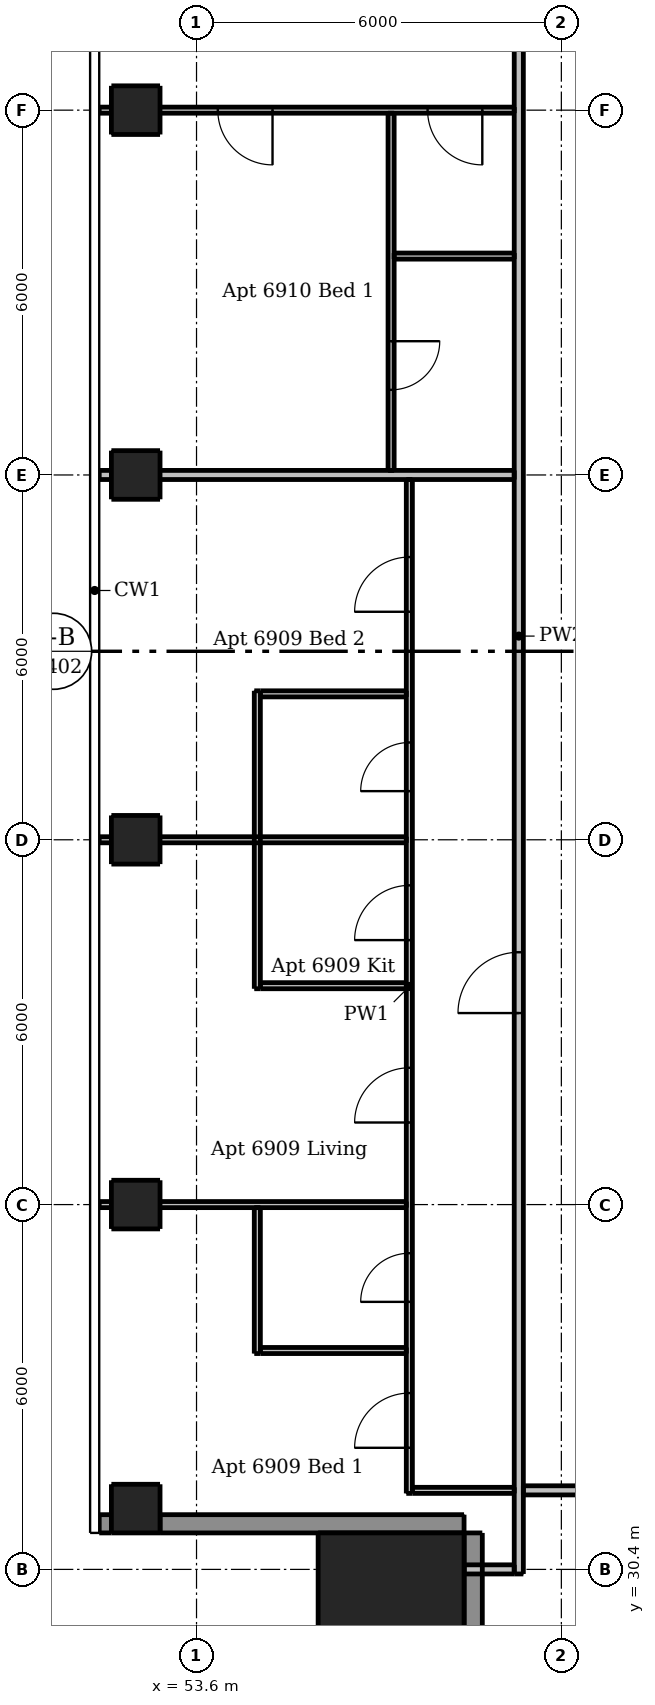
"""IFC4 building model, lengths in metres.
Left out: names, types, materials, properties, quantities, classifications, styles, units other than length and angle.
Written with IfcOpenShell. Run it as: python <this file> out.ifc"""

import sys

from ifc_helpers import new_model, si_unit, direction, frame, frame_2d, origin, origin_2d, place, context, subcontext, project, spatial, rectangle, extrude, element, fill, save


model = new_model("IFC4")
c1 = context("Model", 3, precision=1e-05, world=origin(), true_north=direction((0.0, 1.0)))
c2 = subcontext(c1, "Body", "Model", "MODEL_VIEW")
j1 = project(units=[si_unit("LENGTHUNIT", "METRE"), si_unit("PLANEANGLEUNIT", "RADIAN")], contexts=[c1])
p1 = place(None, origin())
s1 = spatial("IfcSite", under=j1, at=p1, CompositionType="ELEMENT")
p2 = place(p1, origin())
s2 = spatial("IfcBuilding", under=s1, at=p2, CompositionType="ELEMENT")
p3 = place(p2, frame((0.0, 0.0, 258.7)))
s3 = spatial("IfcBuildingStorey", under=s2, at=p3, CompositionType="ELEMENT", Elevation=258.7)
for number, where, z_axis, x_axis in (
    (1, (52.6, 31.4, 0.0), (0.0, 0.0, 1.0), (1.0, 0.0, 0.0)),
    (2, (52.6, 36.4, 0.0), (0.0, 0.0, 1.0), (1.0, 0.0, 0.0)),
    (3, (52.6, 42.4, 0.0), (0.0, 0.0, 1.0), (1.0, 0.0, 0.0)),
    (4, (52.6, 48.4, 0.0), (0.0, 0.0, 1.0), (1.0, 0.0, 0.0)),
    (5, (52.6, 54.4, 0.0), (0.0, 0.0, 1.0), (1.0, 0.0, 0.0)),
):
    element("IfcColumn", number, at=place(p3, frame(where, z_axis=z_axis, x_axis=x_axis)), inside=s3, PredefinedType="COLUMN", context=c2, shape_type="SweptSolid", body=[
        extrude(rectangle(XDim=0.8, YDim=0.8, at=origin_2d()), origin(), (0.0, 0.0, 1.0), 3.05),
    ])
p4 = place(p3, frame((56.8, 29.8, 0.0), z_axis=(0.0, 0.0, 1.0), x_axis=(1.0, 0.0, 0.0)))
e6 = element("IfcColumn", 6, at=p4, inside=s3, PredefinedType="COLUMN", context=c2, shape_type="SweptSolid", body=[
    extrude(rectangle(XDim=2.4, YDim=2.4, at=origin_2d()), origin(), (0.0, 0.0, 1.0), 3.3),
])
p5 = place(p3, frame((52.0, 31.15, 0.0), z_axis=(0.0, 0.0, 1.0), x_axis=(1.0, 0.0, 0.0)))
e7 = element("IfcWall", 7, at=p5, inside=s3, PredefinedType="SOLIDWALL", context=c2, shape_type="SweptSolid", body=[
    extrude(rectangle(XDim=0.2, YDim=0.3, at=frame_2d((0.1, 0.0))), origin(), (0.0, 0.0, 1.0), 3.05),
])
p6 = place(p3, frame((53.0, 31.15, 0.0), z_axis=(0.0, 0.0, 1.0), x_axis=(1.0, 0.0, 0.0)))
e8 = element("IfcWall", 8, at=p6, inside=s3, PredefinedType="SOLIDWALL", context=c2, shape_type="SweptSolid", body=[
    extrude(rectangle(XDim=5.0, YDim=0.3, at=frame_2d((2.5, 0.0))), origin(), (0.0, 0.0, 1.0), 3.05),
])
p7 = place(p3, frame((58.15, 31.0, 0.0), z_axis=(0.0, 0.0, 1.0), x_axis=(0.0, -1.0, 0.0)))
e9 = element("IfcWall", 9, at=p7, inside=s3, PredefinedType="SOLIDWALL", context=c2, shape_type="SweptSolid", body=[
    extrude(rectangle(XDim=6.0, YDim=0.3, at=frame_2d((3.0, 0.0))), origin(), (0.0, 0.0, 1.0), 3.05),
])
p8 = place(p7, frame((1.8, 0.0, 0.15)))
e10 = element("IfcOpeningElement", 10, at=p8, cuts=e9, PredefinedType="OPENING", context=c2, shape_type="SweptSolid", body=[
    extrude(rectangle(XDim=2.4, YDim=2.1, at=frame_2d((1.2, 1.05))), frame((0.0, 0.16, 0.0), z_axis=(0.0, -1.0, 0.0), x_axis=(1.0, 0.0, 0.0)), (0.0, 0.0, 1.0), 0.32),
])
p9 = place(p3, frame((54.6, 33.95, 0.0), z_axis=(0.0, 0.0, 1.0), x_axis=(0.0, 1.0, 0.0)))
e11 = element("IfcWall", 11, at=p9, inside=s3, PredefinedType="PARTITIONING", context=c2, shape_type="SweptSolid", body=[
    extrude(rectangle(XDim=2.4, YDim=0.1, at=frame_2d((1.2, 0.0))), origin(), (0.0, 0.0, 1.0), 3.05),
])
p10 = place(p3, frame((54.6, 39.95, 0.0), z_axis=(0.0, 0.0, 1.0), x_axis=(0.0, 1.0, 0.0)))
e12 = element("IfcWall", 12, at=p10, inside=s3, PredefinedType="PARTITIONING", context=c2, shape_type="SweptSolid", body=[
    extrude(rectangle(XDim=4.9, YDim=0.1, at=frame_2d((2.45, 0.0))), origin(), (0.0, 0.0, 1.0), 3.05),
])
p11 = place(p3, frame((56.8, 54.35, 0.0), z_axis=(0.0, 0.0, 1.0), x_axis=(0.0, -1.0, 0.0)))
e13 = element("IfcWall", 13, at=p11, inside=s3, PredefinedType="PARTITIONING", context=c2, shape_type="SweptSolid", body=[
    extrude(rectangle(XDim=5.875, YDim=0.1, at=frame_2d((2.938, 0.0))), origin(), (0.0, 0.0, 1.0), 3.05),
])
p12 = place(p11, frame((3.75, 0.0, 0.0)))
e14 = element("IfcOpeningElement", 14, at=p12, cuts=e13, PredefinedType="OPENING", context=c2, shape_type="SweptSolid", body=[
    extrude(rectangle(XDim=0.8, YDim=2.1, at=frame_2d((0.4, 1.05))), frame((0.0, 0.06, 0.0), z_axis=(0.0, -1.0, 0.0), x_axis=(1.0, 0.0, 0.0)), (0.0, 0.0, 1.0), 0.12),
])
p13 = place(p3, frame((57.1, 31.65, 0.0), z_axis=(0.0, 0.0, 1.0), x_axis=(0.0, 1.0, 0.0)))
e15 = element("IfcWall", 15, at=p13, inside=s3, PredefinedType="PARTITIONING", context=c2, shape_type="SweptSolid", body=[
    extrude(rectangle(XDim=16.675, YDim=0.1, at=frame_2d((8.337, 0.0))), origin(), (0.0, 0.0, 1.0), 3.05),
])
p14 = place(p13, frame((6.1, 0.0, 0.0)))
e16 = element("IfcOpeningElement", 16, at=p14, cuts=e15, PredefinedType="OPENING", context=c2, shape_type="SweptSolid", body=[
    extrude(rectangle(XDim=0.9, YDim=2.1, at=frame_2d((0.45, 1.05))), frame((0.0, 0.06, 0.0), z_axis=(0.0, -1.0, 0.0), x_axis=(1.0, 0.0, 0.0)), (0.0, 0.0, 1.0), 0.12),
])
p15 = place(p13, frame((9.1, 0.0, 0.0)))
e17 = element("IfcOpeningElement", 17, at=p15, cuts=e15, PredefinedType="OPENING", context=c2, shape_type="SweptSolid", body=[
    extrude(rectangle(XDim=0.9, YDim=2.1, at=frame_2d((0.45, 1.05))), frame((0.0, 0.06, 0.0), z_axis=(0.0, -1.0, 0.0), x_axis=(1.0, 0.0, 0.0)), (0.0, 0.0, 1.0), 0.12),
])
p16 = place(p13, frame((0.75, 0.0, 0.0)))
e18 = element("IfcOpeningElement", 18, at=p16, cuts=e15, PredefinedType="OPENING", context=c2, shape_type="SweptSolid", body=[
    extrude(rectangle(XDim=0.9, YDim=2.1, at=frame_2d((0.45, 1.05))), frame((0.0, 0.06, 0.0), z_axis=(0.0, -1.0, 0.0), x_axis=(1.0, 0.0, 0.0)), (0.0, 0.0, 1.0), 0.12),
])
p17 = place(p13, frame((14.5, 0.0, 0.0)))
e19 = element("IfcOpeningElement", 19, at=p17, cuts=e15, PredefinedType="OPENING", context=c2, shape_type="SweptSolid", body=[
    extrude(rectangle(XDim=0.9, YDim=2.1, at=frame_2d((0.45, 1.05))), frame((0.0, 0.06, 0.0), z_axis=(0.0, -1.0, 0.0), x_axis=(1.0, 0.0, 0.0)), (0.0, 0.0, 1.0), 0.12),
])
p18 = place(p13, frame((3.15, 0.0, 0.0)))
e20 = element("IfcOpeningElement", 20, at=p18, cuts=e15, PredefinedType="OPENING", context=c2, shape_type="SweptSolid", body=[
    extrude(rectangle(XDim=0.8, YDim=2.1, at=frame_2d((0.4, 1.05))), frame((0.0, 0.06, 0.0), z_axis=(0.0, -1.0, 0.0), x_axis=(1.0, 0.0, 0.0)), (0.0, 0.0, 1.0), 0.12),
])
p19 = place(p13, frame((11.55, 0.0, 0.0)))
e21 = element("IfcOpeningElement", 21, at=p19, cuts=e15, PredefinedType="OPENING", context=c2, shape_type="SweptSolid", body=[
    extrude(rectangle(XDim=0.8, YDim=2.1, at=frame_2d((0.4, 1.05))), frame((0.0, 0.06, 0.0), z_axis=(0.0, -1.0, 0.0), x_axis=(1.0, 0.0, 0.0)), (0.0, 0.0, 1.0), 0.12),
])
p20 = place(p3, frame((58.825, 54.4, 0.0), z_axis=(0.0, 0.0, 1.0), x_axis=(-1.0, 0.0, 0.0)))
e22 = element("IfcWall", 22, at=p20, inside=s3, PredefinedType="PARTITIONING", context=c2, shape_type="SweptSolid", body=[
    extrude(rectangle(XDim=6.825, YDim=0.1, at=frame_2d((3.413, 0.0))), origin(), (0.0, 0.0, 1.0), 2.516),
])
p21 = place(p20, frame((0.525, 0.0, 0.0)))
e23 = element("IfcOpeningElement", 23, at=p21, cuts=e22, PredefinedType="OPENING", context=c2, shape_type="SweptSolid", body=[
    extrude(rectangle(XDim=0.9, YDim=2.1, at=frame_2d((0.45, 1.05))), frame((0.0, 0.06, 0.0), z_axis=(0.0, -1.0, 0.0), x_axis=(1.0, 0.0, 0.0)), (0.0, 0.0, 1.0), 0.12),
])
p22 = place(p20, frame((3.975, 0.0, 0.0)))
e24 = element("IfcOpeningElement", 24, at=p22, cuts=e22, PredefinedType="OPENING", context=c2, shape_type="SweptSolid", body=[
    extrude(rectangle(XDim=0.9, YDim=2.1, at=frame_2d((0.45, 1.05))), frame((0.0, 0.06, 0.0), z_axis=(0.0, -1.0, 0.0), x_axis=(1.0, 0.0, 0.0)), (0.0, 0.0, 1.0), 0.12),
])
p23 = place(p3, frame((56.85, 52.0, 0.0), z_axis=(0.0, 0.0, 1.0), x_axis=(1.0, 0.0, 0.0)))
e25 = element("IfcWall", 25, at=p23, inside=s3, PredefinedType="PARTITIONING", context=c2, shape_type="SweptSolid", body=[
    extrude(rectangle(XDim=1.975, YDim=0.1, at=frame_2d((0.987, 0.0))), origin(), (0.0, 0.0, 1.0), 3.05),
])
p24 = place(p3, frame((54.65, 44.8, 0.0), z_axis=(0.0, 0.0, 1.0), x_axis=(1.0, 0.0, 0.0)))
e26 = element("IfcWall", 26, at=p24, inside=s3, PredefinedType="PARTITIONING", context=c2, shape_type="SweptSolid", body=[
    extrude(rectangle(XDim=2.4, YDim=0.1, at=frame_2d((1.2, 0.0))), origin(), (0.0, 0.0, 1.0), 3.05),
])
p25 = place(p3, frame((52.0, 42.4, 0.0), z_axis=(0.0, 0.0, 1.0), x_axis=(1.0, 0.0, 0.0)))
e27 = element("IfcWall", 27, at=p25, inside=s3, PredefinedType="PARTITIONING", context=c2, shape_type="SweptSolid", body=[
    extrude(rectangle(XDim=5.05, YDim=0.1, at=frame_2d((2.525, 0.0))), origin(), (0.0, 0.0, 1.0), 2.516),
])
p26 = place(p3, frame((54.65, 40.0, 0.0), z_axis=(0.0, 0.0, 1.0), x_axis=(1.0, 0.0, 0.0)))
e28 = element("IfcWall", 28, at=p26, inside=s3, PredefinedType="PARTITIONING", context=c2, shape_type="SweptSolid", body=[
    extrude(rectangle(XDim=2.4, YDim=0.1, at=frame_2d((1.2, 0.0))), origin(), (0.0, 0.0, 1.0), 3.05),
])
p27 = place(p3, frame((52.0, 36.4, 0.0), z_axis=(0.0, 0.0, 1.0), x_axis=(1.0, 0.0, 0.0)))
e29 = element("IfcWall", 29, at=p27, inside=s3, PredefinedType="PARTITIONING", context=c2, shape_type="SweptSolid", body=[
    extrude(rectangle(XDim=5.05, YDim=0.1, at=frame_2d((2.525, 0.0))), origin(), (0.0, 0.0, 1.0), 2.516),
])
p28 = place(p3, frame((54.65, 34.0, 0.0), z_axis=(0.0, 0.0, 1.0), x_axis=(1.0, 0.0, 0.0)))
e30 = element("IfcWall", 30, at=p28, inside=s3, PredefinedType="PARTITIONING", context=c2, shape_type="SweptSolid", body=[
    extrude(rectangle(XDim=2.4, YDim=0.1, at=frame_2d((1.2, 0.0))), origin(), (0.0, 0.0, 1.0), 3.05),
])
p29 = place(p3, frame((57.15, 31.7, 0.0), z_axis=(0.0, 0.0, 1.0), x_axis=(1.0, 0.0, 0.0)))
e31 = element("IfcWall", 31, at=p29, inside=s3, PredefinedType="PARTITIONING", context=c2, shape_type="SweptSolid", body=[
    extrude(rectangle(XDim=1.675, YDim=0.1, at=frame_2d((0.837, 0.0))), origin(), (0.0, 0.0, 1.0), 3.05),
])
p30 = place(p3, frame((58.9, 30.325, 0.0), z_axis=(0.0, 0.0, 1.0), x_axis=(0.0, 1.0, 0.0)))
e32 = element("IfcWall", 32, at=p30, inside=s3, PredefinedType="PARTITIONING", context=c2, shape_type="SweptSolid", body=[
    extrude(rectangle(XDim=30.85, YDim=0.15, at=frame_2d((15.425, 0.0))), origin(), (0.0, 0.0, 1.0), 3.05),
])
p31 = place(p30, frame((9.225, 0.0, 0.0)))
e33 = element("IfcOpeningElement", 33, at=p31, cuts=e32, PredefinedType="OPENING", context=c2, shape_type="SweptSolid", body=[
    extrude(rectangle(XDim=1.0, YDim=2.1, at=frame_2d((0.5, 1.05))), frame((0.0, 0.085, 0.0), z_axis=(0.0, -1.0, 0.0), x_axis=(1.0, 0.0, 0.0)), (0.0, 0.0, 1.0), 0.17),
])
p32 = place(p30, frame((26.925, 0.0, 0.0)))
e34 = element("IfcOpeningElement", 34, at=p32, cuts=e32, PredefinedType="OPENING", context=c2, shape_type="SweptSolid", body=[
    extrude(rectangle(XDim=1.0, YDim=2.1, at=frame_2d((0.5, 1.05))), frame((0.0, 0.085, 0.0), z_axis=(0.0, -1.0, 0.0), x_axis=(1.0, 0.0, 0.0)), (0.0, 0.0, 1.0), 0.17),
])
p33 = place(p3, frame((52.0, 48.4, 0.0), z_axis=(0.0, 0.0, 1.0), x_axis=(1.0, 0.0, 0.0)))
e35 = element("IfcWall", 35, at=p33, inside=s3, PredefinedType="PARTITIONING", context=c2, shape_type="SweptSolid", body=[
    extrude(rectangle(XDim=6.825, YDim=0.15, at=frame_2d((3.413, 0.0))), origin(), (0.0, 0.0, 1.0), 2.516),
])
p34 = place(p3, frame((89.525, 31.7, 0.0), z_axis=(0.0, 0.0, 1.0), x_axis=(-1.0, 0.0, 0.0)))
e36 = element("IfcWall", 36, at=p34, inside=s3, PredefinedType="PARTITIONING", context=c2, shape_type="SweptSolid", body=[
    extrude(rectangle(XDim=30.55, YDim=0.15, at=frame_2d((15.275, 0.0))), origin(), (0.0, 0.0, 1.0), 3.05),
])
p35 = place(p34, frame((26.775, 0.0, 0.0)))
e37 = element("IfcOpeningElement", 37, at=p35, cuts=e36, PredefinedType="OPENING", context=c2, shape_type="SweptSolid", body=[
    extrude(rectangle(XDim=1.0, YDim=2.1, at=frame_2d((0.5, 1.05))), frame((0.0, 0.085, 0.0), z_axis=(0.0, -1.0, 0.0), x_axis=(1.0, 0.0, 0.0)), (0.0, 0.0, 1.0), 0.17),
])
p36 = place(p34, frame((9.625, 0.0, 0.0)))
e38 = element("IfcOpeningElement", 38, at=p36, cuts=e36, PredefinedType="OPENING", context=c2, shape_type="SweptSolid", body=[
    extrude(rectangle(XDim=1.0, YDim=2.1, at=frame_2d((0.5, 1.05))), frame((0.0, 0.085, 0.0), z_axis=(0.0, -1.0, 0.0), x_axis=(1.0, 0.0, 0.0)), (0.0, 0.0, 1.0), 0.17),
])
p37 = place(p34, frame((2.425, 0.0, 0.0)))
e39 = element("IfcOpeningElement", 39, at=p37, cuts=e36, PredefinedType="OPENING", context=c2, shape_type="SweptSolid", body=[
    extrude(rectangle(XDim=1.0, YDim=2.1, at=frame_2d((0.5, 1.05))), frame((0.0, 0.085, 0.0), z_axis=(0.0, -1.0, 0.0), x_axis=(1.0, 0.0, 0.0)), (0.0, 0.0, 1.0), 0.17),
])
p38 = place(p3, frame((58.0, 30.4, 0.0), z_axis=(0.0, 0.0, 1.0), x_axis=(1.0, 0.0, 0.0)))
e40 = element("IfcWall", 40, at=p38, inside=s3, PredefinedType="PARTITIONING", context=c2, shape_type="SweptSolid", body=[
    extrude(rectangle(XDim=0.825, YDim=0.15, at=frame_2d((0.413, 0.0))), origin(), (0.0, 0.0, 1.0), 3.05),
])
p39 = place(p31, origin())
e41 = element("IfcDoor", 41, at=p39, inside=s3, OperationType="SINGLE_SWING_LEFT", PredefinedType="DOOR", context=c2, shape_type="SweptSolid", body=[
    extrude(rectangle(XDim=1.0, YDim=2.1, at=frame_2d((0.5, 1.05))), frame((0.0, 0.025, 0.0), z_axis=(0.0, -1.0, 0.0), x_axis=(1.0, 0.0, 0.0)), (0.0, 0.0, 1.0), 0.05),
])
fill(e33, e41)
p40 = place(p14, origin())
e42 = element("IfcDoor", 42, at=p40, inside=s3, OperationType="SINGLE_SWING_LEFT", PredefinedType="DOOR", context=c2, shape_type="SweptSolid", body=[
    extrude(rectangle(XDim=0.9, YDim=2.1, at=frame_2d((0.45, 1.05))), frame((0.0, 0.025, 0.0), z_axis=(0.0, -1.0, 0.0), x_axis=(1.0, 0.0, 0.0)), (0.0, 0.0, 1.0), 0.05),
])
fill(e16, e42)
p41 = place(p15, origin())
e43 = element("IfcDoor", 43, at=p41, inside=s3, OperationType="SINGLE_SWING_LEFT", PredefinedType="DOOR", context=c2, shape_type="SweptSolid", body=[
    extrude(rectangle(XDim=0.9, YDim=2.1, at=frame_2d((0.45, 1.05))), frame((0.0, 0.025, 0.0), z_axis=(0.0, -1.0, 0.0), x_axis=(1.0, 0.0, 0.0)), (0.0, 0.0, 1.0), 0.05),
])
fill(e17, e43)
p42 = place(p16, origin())
e44 = element("IfcDoor", 44, at=p42, inside=s3, OperationType="SINGLE_SWING_LEFT", PredefinedType="DOOR", context=c2, shape_type="SweptSolid", body=[
    extrude(rectangle(XDim=0.9, YDim=2.1, at=frame_2d((0.45, 1.05))), frame((0.0, 0.025, 0.0), z_axis=(0.0, -1.0, 0.0), x_axis=(1.0, 0.0, 0.0)), (0.0, 0.0, 1.0), 0.05),
])
fill(e18, e44)
p43 = place(p17, origin())
e45 = element("IfcDoor", 45, at=p43, inside=s3, OperationType="SINGLE_SWING_LEFT", PredefinedType="DOOR", context=c2, shape_type="SweptSolid", body=[
    extrude(rectangle(XDim=0.9, YDim=2.1, at=frame_2d((0.45, 1.05))), frame((0.0, 0.025, 0.0), z_axis=(0.0, -1.0, 0.0), x_axis=(1.0, 0.0, 0.0)), (0.0, 0.0, 1.0), 0.05),
])
fill(e19, e45)
p44 = place(p18, origin())
e46 = element("IfcDoor", 46, at=p44, inside=s3, OperationType="SINGLE_SWING_LEFT", PredefinedType="DOOR", context=c2, shape_type="SweptSolid", body=[
    extrude(rectangle(XDim=0.8, YDim=2.1, at=frame_2d((0.4, 1.05))), frame((0.0, 0.025, 0.0), z_axis=(0.0, -1.0, 0.0), x_axis=(1.0, 0.0, 0.0)), (0.0, 0.0, 1.0), 0.05),
])
fill(e20, e46)
p45 = place(p19, origin())
e47 = element("IfcDoor", 47, at=p45, inside=s3, OperationType="SINGLE_SWING_LEFT", PredefinedType="DOOR", context=c2, shape_type="SweptSolid", body=[
    extrude(rectangle(XDim=0.8, YDim=2.1, at=frame_2d((0.4, 1.05))), frame((0.0, 0.025, 0.0), z_axis=(0.0, -1.0, 0.0), x_axis=(1.0, 0.0, 0.0)), (0.0, 0.0, 1.0), 0.05),
])
fill(e21, e47)
p46 = place(p21, origin())
e48 = element("IfcDoor", 48, at=p46, inside=s3, OperationType="SINGLE_SWING_LEFT", PredefinedType="DOOR", context=c2, shape_type="SweptSolid", body=[
    extrude(rectangle(XDim=0.9, YDim=2.1, at=frame_2d((0.45, 1.05))), frame((0.0, 0.025, 0.0), z_axis=(0.0, -1.0, 0.0), x_axis=(1.0, 0.0, 0.0)), (0.0, 0.0, 1.0), 0.05),
])
fill(e23, e48)
p47 = place(p22, origin())
e49 = element("IfcDoor", 49, at=p47, inside=s3, OperationType="SINGLE_SWING_LEFT", PredefinedType="DOOR", context=c2, shape_type="SweptSolid", body=[
    extrude(rectangle(XDim=0.9, YDim=2.1, at=frame_2d((0.45, 1.05))), frame((0.0, 0.025, 0.0), z_axis=(0.0, -1.0, 0.0), x_axis=(1.0, 0.0, 0.0)), (0.0, 0.0, 1.0), 0.05),
])
fill(e24, e49)
p48 = place(p12, origin())
e50 = element("IfcDoor", 50, at=p48, inside=s3, OperationType="SINGLE_SWING_LEFT", PredefinedType="DOOR", context=c2, shape_type="SweptSolid", body=[
    extrude(rectangle(XDim=0.8, YDim=2.1, at=frame_2d((0.4, 1.05))), frame((0.0, 0.025, 0.0), z_axis=(0.0, -1.0, 0.0), x_axis=(1.0, 0.0, 0.0)), (0.0, 0.0, 1.0), 0.05),
])
fill(e14, e50)
save(model, sys.argv[1])
